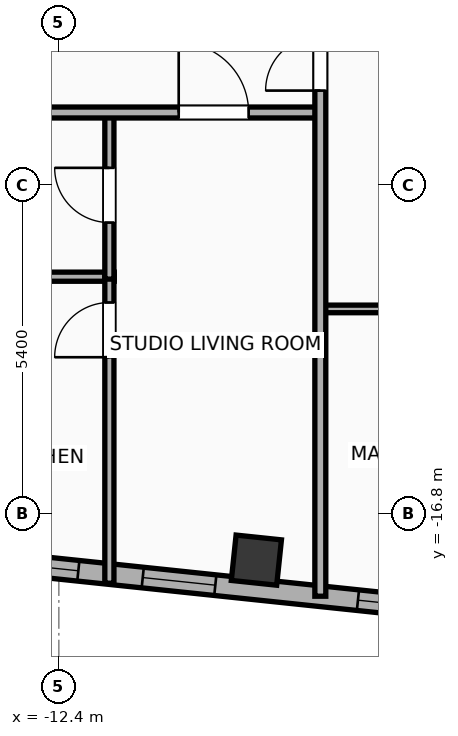
"""IFC4 building model, lengths in metres.
Left out: names, types, materials, properties, quantities, classifications, styles, units other than length and angle.
Written with IfcOpenShell. Run it as: python <this file> out.ifc"""

import sys

from ifc_helpers import new_model, si_unit, direction, frame, frame_2d, origin, origin_2d, place, context, subcontext, project, spatial, rectangle, hollow_rectangle, extrude, element, fill, save


model = new_model("IFC4")
c1 = context("Model", 3, precision=1e-05, world=origin(), true_north=direction((0.0, 1.0)))
c2 = subcontext(c1, "Body", "Model", "MODEL_VIEW")
j1 = project(units=[si_unit("LENGTHUNIT", "METRE"), si_unit("PLANEANGLEUNIT", "RADIAN")], contexts=[c1])
p1 = place(None, origin())
s1 = spatial("IfcSite", under=j1, at=p1, CompositionType="ELEMENT")
p2 = place(p1, origin())
s2 = spatial("IfcBuilding", under=s1, at=p2, CompositionType="ELEMENT")
p3 = place(p2, frame((0.0, 0.0, 295.1)))
s3 = spatial("IfcBuildingStorey", under=s2, at=p3, CompositionType="ELEMENT", Elevation=295.1)
p4 = place(p3, frame((-9.152, -17.561, 0.0), z_axis=(0.0, 0.0, 1.0), x_axis=(0.994521895368, -0.104528463268, 0.0)))
e1 = element("IfcColumn", 1, at=p4, inside=s3, PredefinedType="COLUMN", context=c2, shape_type="SweptSolid", body=[
    extrude(hollow_rectangle(XDim=0.75, YDim=0.75, WallThickness=0.025, at=origin_2d()), origin(), (0.0, 0.0, 1.0), 3.9),
])
p5 = place(p3, frame((18.708, -20.972, 0.0), z_axis=(0.0, 0.0, 1.0), x_axis=(-0.994521888554, 0.104528528102, 0.0)))
e2 = element("IfcWall", 2, at=p5, inside=s3, PredefinedType="ELEMENTEDWALL", context=c2, shape_type="SweptSolid", body=[
    extrude(rectangle(XDim=46.766, YDim=0.34, at=frame_2d((23.383, 0.0))), origin(), (0.0, 0.0, 1.0), 3.635),
])
p6 = place(p5, frame((23.733, 0.0, 0.65)))
e3 = element("IfcOpeningElement", 3, at=p6, cuts=e2, PredefinedType="OPENING", context=c2, shape_type="SweptSolid", body=[
    extrude(rectangle(XDim=2.6, YDim=2.45, at=frame_2d((1.3, 1.225))), frame((0.0, 0.18, 0.0), z_axis=(0.0, -1.0, 0.0), x_axis=(1.0, 0.0, 0.0)), (0.0, 0.0, 1.0), 0.36),
])
p7 = place(p5, frame((44.402, 0.0, 0.75)))
e4 = element("IfcOpeningElement", 4, at=p7, cuts=e2, PredefinedType="OPENING", context=c2, shape_type="SweptSolid", body=[
    extrude(rectangle(XDim=1.2, YDim=2.05, at=frame_2d((0.6, 1.025))), frame((0.0, 0.18, 0.0), z_axis=(0.0, -1.0, 0.0), x_axis=(1.0, 0.0, 0.0)), (0.0, 0.0, 1.0), 0.36),
])
p8 = place(p5, frame((39.553, 0.0, 0.75)))
e5 = element("IfcOpeningElement", 5, at=p8, cuts=e2, PredefinedType="OPENING", context=c2, shape_type="SweptSolid", body=[
    extrude(rectangle(XDim=1.2, YDim=2.05, at=frame_2d((0.6, 1.025))), frame((0.0, 0.18, 0.0), z_axis=(0.0, -1.0, 0.0), x_axis=(1.0, 0.0, 0.0)), (0.0, 0.0, 1.0), 0.36),
])
p9 = place(p5, frame((42.419, 0.0, 0.75)))
e6 = element("IfcOpeningElement", 6, at=p9, cuts=e2, PredefinedType="OPENING", context=c2, shape_type="SweptSolid", body=[
    extrude(rectangle(XDim=1.2, YDim=2.05, at=frame_2d((0.6, 1.025))), frame((0.0, 0.18, 0.0), z_axis=(0.0, -1.0, 0.0), x_axis=(1.0, 0.0, 0.0)), (0.0, 0.0, 1.0), 0.36),
])
p10 = place(p5, frame((34.933, 0.0, 0.75)))
e7 = element("IfcOpeningElement", 7, at=p10, cuts=e2, PredefinedType="OPENING", context=c2, shape_type="SweptSolid", body=[
    extrude(rectangle(XDim=1.2, YDim=2.05, at=frame_2d((0.6, 1.025))), frame((0.0, 0.18, 0.0), z_axis=(0.0, -1.0, 0.0), x_axis=(1.0, 0.0, 0.0)), (0.0, 0.0, 1.0), 0.36),
])
p11 = place(p5, frame((28.692, 0.0, 0.75)))
e8 = element("IfcOpeningElement", 8, at=p11, cuts=e2, PredefinedType="OPENING", context=c2, shape_type="SweptSolid", body=[
    extrude(rectangle(XDim=1.2, YDim=2.05, at=frame_2d((0.6, 1.025))), frame((0.0, 0.18, 0.0), z_axis=(0.0, -1.0, 0.0), x_axis=(1.0, 0.0, 0.0)), (0.0, 0.0, 1.0), 0.36),
])
p12 = place(p5, frame((30.957, 0.0, 0.75)))
e9 = element("IfcOpeningElement", 9, at=p12, cuts=e2, PredefinedType="OPENING", context=c2, shape_type="SweptSolid", body=[
    extrude(rectangle(XDim=1.2, YDim=2.05, at=frame_2d((0.6, 1.025))), frame((0.0, 0.18, 0.0), z_axis=(0.0, -1.0, 0.0), x_axis=(1.0, 0.0, 0.0)), (0.0, 0.0, 1.0), 0.36),
])
p13 = place(p5, frame((7.495, 0.0, 0.75)))
e10 = element("IfcOpeningElement", 10, at=p13, cuts=e2, PredefinedType="OPENING", context=c2, shape_type="SweptSolid", body=[
    extrude(rectangle(XDim=1.2, YDim=2.05, at=frame_2d((0.6, 1.025))), frame((0.0, 0.18, 0.0), z_axis=(0.0, -1.0, 0.0), x_axis=(1.0, 0.0, 0.0)), (0.0, 0.0, 1.0), 0.36),
])
p14 = place(p5, frame((4.146, 0.0, 0.75)))
e11 = element("IfcOpeningElement", 11, at=p14, cuts=e2, PredefinedType="OPENING", context=c2, shape_type="SweptSolid", body=[
    extrude(rectangle(XDim=1.2, YDim=2.05, at=frame_2d((0.6, 1.025))), frame((0.0, 0.18, 0.0), z_axis=(0.0, -1.0, 0.0), x_axis=(1.0, 0.0, 0.0)), (0.0, 0.0, 1.0), 0.36),
])
p15 = place(p5, frame((1.362, 0.0, 0.75)))
e12 = element("IfcOpeningElement", 12, at=p15, cuts=e2, PredefinedType="OPENING", context=c2, shape_type="SweptSolid", body=[
    extrude(rectangle(XDim=1.2, YDim=2.05, at=frame_2d((0.6, 1.025))), frame((0.0, 0.18, 0.0), z_axis=(0.0, -1.0, 0.0), x_axis=(1.0, 0.0, 0.0)), (0.0, 0.0, 1.0), 0.36),
])
p16 = place(p5, frame((20.254, 0.0, 0.75)))
e13 = element("IfcOpeningElement", 13, at=p16, cuts=e2, PredefinedType="OPENING", context=c2, shape_type="SweptSolid", body=[
    extrude(rectangle(XDim=1.2, YDim=2.05, at=frame_2d((0.6, 1.025))), frame((0.0, 0.18, 0.0), z_axis=(0.0, -1.0, 0.0), x_axis=(1.0, 0.0, 0.0)), (0.0, 0.0, 1.0), 0.36),
])
p17 = place(p5, frame((16.172, 0.0, 0.75)))
e14 = element("IfcOpeningElement", 14, at=p17, cuts=e2, PredefinedType="OPENING", context=c2, shape_type="SweptSolid", body=[
    extrude(rectangle(XDim=1.2, YDim=2.05, at=frame_2d((0.6, 1.025))), frame((0.0, 0.18, 0.0), z_axis=(0.0, -1.0, 0.0), x_axis=(1.0, 0.0, 0.0)), (0.0, 0.0, 1.0), 0.36),
])
p18 = place(p5, frame((12.11, 0.0, 0.75)))
e15 = element("IfcOpeningElement", 15, at=p18, cuts=e2, PredefinedType="OPENING", context=c2, shape_type="SweptSolid", body=[
    extrude(rectangle(XDim=1.2, YDim=2.05, at=frame_2d((0.6, 1.025))), frame((0.0, 0.18, 0.0), z_axis=(0.0, -1.0, 0.0), x_axis=(1.0, 0.0, 0.0)), (0.0, 0.0, 1.0), 0.36),
])
p19 = place(p3, frame((-14.039, -12.9, 0.0), z_axis=(0.0, 0.0, 1.0), x_axis=(1.0, 0.0, 0.0)))
e16 = element("IfcWall", 16, at=p19, inside=s3, PredefinedType="PLUMBINGWALL", context=c2, shape_type="SweptSolid", body=[
    extrude(rectangle(XDim=2.55, YDim=0.15, at=frame_2d((1.275, 0.0))), origin(), (0.0, 0.0, 1.0), 3.635),
])
p20 = place(p3, frame((-11.569, -17.941, 0.0), z_axis=(0.0, 0.0, 1.0), x_axis=(0.0, 1.0, 0.0)))
e17 = element("IfcWall", 17, at=p20, inside=s3, PredefinedType="PLUMBINGWALL", context=c2, shape_type="SweptSolid", body=[
    extrude(rectangle(XDim=5.081, YDim=0.15, at=frame_2d((2.541, 0.0))), origin(), (0.0, 0.0, 1.0), 3.635),
])
p21 = place(p20, frame((3.716, 0.0, 0.0)))
e18 = element("IfcOpeningElement", 18, at=p21, cuts=e17, PredefinedType="OPENING", context=c2, shape_type="SweptSolid", body=[
    extrude(rectangle(XDim=0.9, YDim=2.05, at=frame_2d((0.45, 1.025))), frame((0.0, 0.085, 0.0), z_axis=(0.0, -1.0, 0.0), x_axis=(1.0, 0.0, 0.0)), (0.0, 0.0, 1.0), 0.17),
])
p22 = place(p3, frame((-11.569, -12.94, 0.0), z_axis=(0.0, 0.0, 1.0), x_axis=(0.0, 1.0, 0.0)))
e19 = element("IfcWall", 19, at=p22, inside=s3, PredefinedType="PLUMBINGWALL", context=c2, shape_type="SweptSolid", body=[
    extrude(rectangle(XDim=2.76, YDim=0.15, at=frame_2d((1.38, 0.0))), origin(), (0.0, 0.0, 1.0), 3.075),
])
p23 = place(p22, frame((0.93, 0.0, 0.0)))
e20 = element("IfcOpeningElement", 20, at=p23, cuts=e19, PredefinedType="OPENING", context=c2, shape_type="SweptSolid", body=[
    extrude(rectangle(XDim=0.9, YDim=2.05, at=frame_2d((0.45, 1.025))), frame((0.0, 0.085, 0.0), z_axis=(0.0, -1.0, 0.0), x_axis=(1.0, 0.0, 0.0)), (0.0, 0.0, 1.0), 0.17),
])
p24 = place(p3, frame((-30.65, -10.2, 0.0), z_axis=(0.0, 0.0, 1.0), x_axis=(1.0, 0.0, 0.0)))
e21 = element("IfcWall", 21, at=p24, inside=s3, PredefinedType="PARTITIONING", context=c2, shape_type="SweptSolid", body=[
    extrude(rectangle(XDim=22.57, YDim=0.18, at=frame_2d((11.285, 0.0))), origin(), (0.0, 0.0, 1.0), 3.635),
])
p25 = place(p24, frame((2.308, 0.0, 0.0)))
e22 = element("IfcOpeningElement", 22, at=p25, cuts=e21, PredefinedType="OPENING", context=c2, shape_type="SweptSolid", body=[
    extrude(rectangle(XDim=0.9, YDim=2.05, at=frame_2d((0.45, 1.025))), frame((0.0, 0.1, 0.0), z_axis=(0.0, -1.0, 0.0), x_axis=(1.0, 0.0, 0.0)), (0.0, 0.0, 1.0), 0.2),
])
p26 = place(p24, frame((8.821, 0.0, 0.0)))
e23 = element("IfcOpeningElement", 23, at=p26, cuts=e21, PredefinedType="OPENING", context=c2, shape_type="SweptSolid", body=[
    extrude(rectangle(XDim=1.15, YDim=2.05, at=frame_2d((0.575, 1.025))), frame((0.0, 0.1, 0.0), z_axis=(0.0, -1.0, 0.0), x_axis=(1.0, 0.0, 0.0)), (0.0, 0.0, 1.0), 0.2),
])
p27 = place(p24, frame((13.749, 0.0, 0.0)))
e24 = element("IfcOpeningElement", 24, at=p27, cuts=e21, PredefinedType="OPENING", context=c2, shape_type="SweptSolid", body=[
    extrude(rectangle(XDim=0.9, YDim=2.05, at=frame_2d((0.45, 1.025))), frame((0.0, 0.1, 0.0), z_axis=(0.0, -1.0, 0.0), x_axis=(1.0, 0.0, 0.0)), (0.0, 0.0, 1.0), 0.2),
])
p28 = place(p24, frame((20.221, 0.0, 0.0)))
e25 = element("IfcOpeningElement", 25, at=p28, cuts=e21, PredefinedType="OPENING", context=c2, shape_type="SweptSolid", body=[
    extrude(rectangle(XDim=1.15, YDim=2.05, at=frame_2d((0.575, 1.025))), frame((0.0, 0.1, 0.0), z_axis=(0.0, -1.0, 0.0), x_axis=(1.0, 0.0, 0.0)), (0.0, 0.0, 1.0), 0.2),
])
p29 = place(p3, frame((-8.08, -13.43, 0.0), z_axis=(0.0, 0.0, 1.0), x_axis=(1.0, 0.0, 0.0)))
e26 = element("IfcWall", 26, at=p29, inside=s3, PredefinedType="PARTITIONING", context=c2, shape_type="SweptSolid", body=[
    extrude(rectangle(XDim=8.06, YDim=0.125, at=frame_2d((4.03, 0.0))), origin(), (0.0, 0.0, 1.0), 3.635),
])
p30 = place(p29, frame((1.323, 0.0, 0.0)))
e27 = element("IfcOpeningElement", 27, at=p30, cuts=e26, PredefinedType="OPENING", context=c2, shape_type="SweptSolid", body=[
    extrude(rectangle(XDim=0.9, YDim=2.05, at=frame_2d((0.45, 1.025))), frame((0.0, 0.073, 0.0), z_axis=(0.0, -1.0, 0.0), x_axis=(1.0, 0.0, 0.0)), (0.0, 0.0, 1.0), 0.145),
])
p31 = place(p29, frame((4.547, 0.0, 0.0)))
e28 = element("IfcOpeningElement", 28, at=p31, cuts=e26, PredefinedType="OPENING", context=c2, shape_type="SweptSolid", body=[
    extrude(rectangle(XDim=0.9, YDim=2.05, at=frame_2d((0.45, 1.025))), frame((0.0, 0.073, 0.0), z_axis=(0.0, -1.0, 0.0), x_axis=(1.0, 0.0, 0.0)), (0.0, 0.0, 1.0), 0.145),
])
p32 = place(p3, frame((-8.1, -18.155, 0.0), z_axis=(0.0, 0.0, 1.0), x_axis=(0.0, 1.0, 0.0)))
e29 = element("IfcWall", 29, at=p32, inside=s3, PredefinedType="PARTITIONING", context=c2, shape_type="SweptSolid", body=[
    extrude(rectangle(XDim=9.564, YDim=0.18, at=frame_2d((4.782, 0.0))), origin(), (0.0, 0.0, 1.0), 3.635),
])
p33 = place(p32, frame((8.315, 0.0, 0.0)))
e30 = element("IfcOpeningElement", 30, at=p33, cuts=e29, PredefinedType="OPENING", context=c2, shape_type="SweptSolid", body=[
    extrude(rectangle(XDim=0.9, YDim=2.05, at=frame_2d((0.45, 1.025))), frame((0.0, 0.1, 0.0), z_axis=(0.0, -1.0, 0.0), x_axis=(1.0, 0.0, 0.0)), (0.0, 0.0, 1.0), 0.2),
])
p34 = place(p6, origin())
e31 = element("IfcWindow", 31, at=p34, inside=s3, PartitioningType="SINGLE_PANEL", PredefinedType="WINDOW", context=c2, shape_type="SweptSolid", body=[
    extrude(rectangle(XDim=2.6, YDim=2.45, at=frame_2d((1.3, 1.225))), frame((0.0, 0.03, 0.0), z_axis=(0.0, -1.0, 0.0), x_axis=(1.0, 0.0, 0.0)), (0.0, 0.0, 1.0), 0.06),
])
fill(e3, e31)
p35 = place(p11, origin())
e32 = element("IfcWindow", 32, at=p35, inside=s3, PartitioningType="SINGLE_PANEL", PredefinedType="WINDOW", context=c2, shape_type="SweptSolid", body=[
    extrude(rectangle(XDim=1.2, YDim=2.05, at=frame_2d((0.6, 1.025))), frame((0.0, 0.03, 0.0), z_axis=(0.0, -1.0, 0.0), x_axis=(1.0, 0.0, 0.0)), (0.0, 0.0, 1.0), 0.06),
])
fill(e8, e32)
p36 = place(p12, origin())
e33 = element("IfcWindow", 33, at=p36, inside=s3, PartitioningType="SINGLE_PANEL", PredefinedType="WINDOW", context=c2, shape_type="SweptSolid", body=[
    extrude(rectangle(XDim=1.2, YDim=2.05, at=frame_2d((0.6, 1.025))), frame((0.0, 0.03, 0.0), z_axis=(0.0, -1.0, 0.0), x_axis=(1.0, 0.0, 0.0)), (0.0, 0.0, 1.0), 0.06),
])
fill(e9, e33)
p37 = place(p21, origin())
e34 = element("IfcDoor", 34, at=p37, inside=s3, OperationType="SINGLE_SWING_LEFT", PredefinedType="DOOR", context=c2, shape_type="SweptSolid", body=[
    extrude(rectangle(XDim=0.9, YDim=2.05, at=frame_2d((0.45, 1.025))), frame((0.0, 0.025, 0.0), z_axis=(0.0, -1.0, 0.0), x_axis=(1.0, 0.0, 0.0)), (0.0, 0.0, 1.0), 0.05),
])
fill(e18, e34)
p38 = place(p23, origin())
e35 = element("IfcDoor", 35, at=p38, inside=s3, OperationType="SINGLE_SWING_RIGHT", PredefinedType="DOOR", context=c2, shape_type="SweptSolid", body=[
    extrude(rectangle(XDim=0.9, YDim=2.05, at=frame_2d((0.45, 1.025))), frame((0.0, 0.025, 0.0), z_axis=(0.0, -1.0, 0.0), x_axis=(1.0, 0.0, 0.0)), (0.0, 0.0, 1.0), 0.05),
])
fill(e20, e35)
p39 = place(p28, origin())
e36 = element("IfcDoor", 36, at=p39, inside=s3, OperationType="SINGLE_SWING_LEFT", PredefinedType="DOOR", context=c2, shape_type="SweptSolid", body=[
    extrude(rectangle(XDim=1.15, YDim=2.05, at=frame_2d((0.575, 1.025))), frame((0.0, 0.025, 0.0), z_axis=(0.0, -1.0, 0.0), x_axis=(1.0, 0.0, 0.0)), (0.0, 0.0, 1.0), 0.05),
])
fill(e25, e36)
p40 = place(p33, origin())
e37 = element("IfcDoor", 37, at=p40, inside=s3, OperationType="SINGLE_SWING_LEFT", PredefinedType="DOOR", context=c2, shape_type="SweptSolid", body=[
    extrude(rectangle(XDim=0.9, YDim=2.05, at=frame_2d((0.45, 1.025))), frame((0.0, 0.025, 0.0), z_axis=(0.0, -1.0, 0.0), x_axis=(1.0, 0.0, 0.0)), (0.0, 0.0, 1.0), 0.05),
])
fill(e30, e37)
save(model, sys.argv[1])
